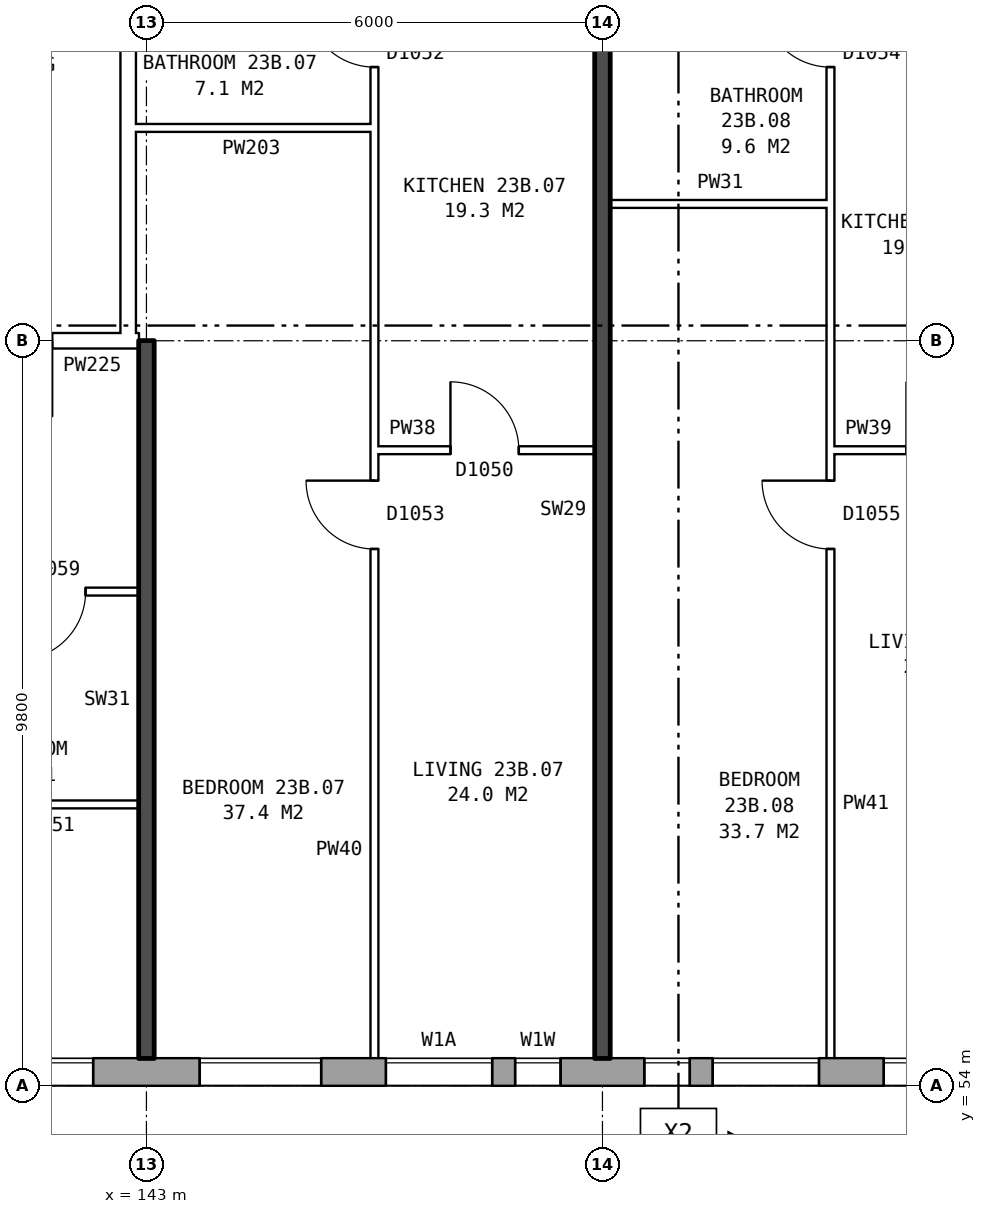
"""IFC4 building model, lengths in metres.
Left out: names, types, materials, properties, quantities, classifications, styles, units other than length and angle.
Written with IfcOpenShell. Run it as: python <this file> out.ifc"""

import sys

from ifc_helpers import new_model, si_unit, direction, frame, frame_2d, origin, place, context, subcontext, project, spatial, rectangle, extrude, element, fill, save


model = new_model("IFC4")
c1 = context("Model", 3, precision=1e-05, world=origin(), true_north=direction((0.0, 1.0)))
c2 = subcontext(c1, "Body", "Model", "MODEL_VIEW")
j1 = project(units=[si_unit("LENGTHUNIT", "METRE"), si_unit("PLANEANGLEUNIT", "RADIAN")], contexts=[c1])
p1 = place(None, origin())
s1 = spatial("IfcSite", under=j1, at=p1, CompositionType="ELEMENT")
p2 = place(p1, origin())
s2 = spatial("IfcBuilding", under=s1, at=p2, CompositionType="ELEMENT")
p3 = place(p2, frame((0.0, 0.0, 84.0)))
s3 = spatial("IfcBuildingStorey", under=s2, at=p3, CompositionType="ELEMENT", Elevation=84.0)
p4 = place(p3, frame((134.075, 54.18, 0.0), z_axis=(0.0, 0.0, 1.0), x_axis=(1.0, 0.0, 0.0)))
e1 = element("IfcWall", 1, at=p4, inside=s3, PredefinedType="STANDARD", context=c2, shape_type="SweptSolid", body=[
    extrude(rectangle(XDim=38.101, YDim=0.36, at=frame_2d((19.05, 0.0))), origin(), (0.0, 0.0, 1.0), 2.85),
])
p5 = place(p4, frame((0.625, 0.0, 0.8)))
e2 = element("IfcOpeningElement", 2, at=p5, cuts=e1, PredefinedType="OPENING", context=c2, shape_type="SweptSolid", body=[
    extrude(rectangle(XDim=1.6, YDim=1.8, at=frame_2d((0.8, 0.9))), frame((0.0, 0.19, 0.0), z_axis=(0.0, -1.0, 0.0), x_axis=(1.0, 0.0, 0.0)), (0.0, 0.0, 1.0), 0.38),
])
p6 = place(p4, frame((3.625, 0.0, 0.8)))
e3 = element("IfcOpeningElement", 3, at=p6, cuts=e1, PredefinedType="OPENING", context=c2, shape_type="SweptSolid", body=[
    extrude(rectangle(XDim=1.6, YDim=1.8, at=frame_2d((0.8, 0.9))), frame((0.0, 0.19, 0.0), z_axis=(0.0, -1.0, 0.0), x_axis=(1.0, 0.0, 0.0)), (0.0, 0.0, 1.0), 0.38),
])
p7 = place(p4, frame((6.625, 0.0, 0.8)))
e4 = element("IfcOpeningElement", 4, at=p7, cuts=e1, PredefinedType="OPENING", context=c2, shape_type="SweptSolid", body=[
    extrude(rectangle(XDim=1.6, YDim=1.8, at=frame_2d((0.8, 0.9))), frame((0.0, 0.19, 0.0), z_axis=(0.0, -1.0, 0.0), x_axis=(1.0, 0.0, 0.0)), (0.0, 0.0, 1.0), 0.38),
])
p8 = place(p4, frame((9.625, 0.0, 0.8)))
e5 = element("IfcOpeningElement", 5, at=p8, cuts=e1, PredefinedType="OPENING", context=c2, shape_type="SweptSolid", body=[
    extrude(rectangle(XDim=1.6, YDim=1.8, at=frame_2d((0.8, 0.9))), frame((0.0, 0.19, 0.0), z_axis=(0.0, -1.0, 0.0), x_axis=(1.0, 0.0, 0.0)), (0.0, 0.0, 1.0), 0.38),
])
p9 = place(p4, frame((12.075, 0.0, 0.8)))
e6 = element("IfcOpeningElement", 6, at=p9, cuts=e1, PredefinedType="OPENING", context=c2, shape_type="SweptSolid", body=[
    extrude(rectangle(XDim=1.4, YDim=1.8, at=frame_2d((0.7, 0.9))), frame((0.0, 0.19, 0.0), z_axis=(0.0, -1.0, 0.0), x_axis=(1.0, 0.0, 0.0)), (0.0, 0.0, 1.0), 0.38),
])
p10 = place(p4, frame((15.475, 0.0, 0.65)))
e7 = element("IfcOpeningElement", 7, at=p10, cuts=e1, PredefinedType="OPENING", context=c2, shape_type="SweptSolid", body=[
    extrude(rectangle(XDim=0.6, YDim=0.9, at=frame_2d((0.3, 0.45))), frame((0.0, 0.19, 0.0), z_axis=(0.0, -1.0, 0.0), x_axis=(1.0, 0.0, 0.0)), (0.0, 0.0, 1.0), 0.38),
])
p11 = place(p4, frame((18.625, 0.0, 0.8)))
e8 = element("IfcOpeningElement", 8, at=p11, cuts=e1, PredefinedType="OPENING", context=c2, shape_type="SweptSolid", body=[
    extrude(rectangle(XDim=1.6, YDim=1.8, at=frame_2d((0.8, 0.9))), frame((0.0, 0.19, 0.0), z_axis=(0.0, -1.0, 0.0), x_axis=(1.0, 0.0, 0.0)), (0.0, 0.0, 1.0), 0.38),
])
p12 = place(p4, frame((21.125, 0.0, 0.8)))
e9 = element("IfcOpeningElement", 9, at=p12, cuts=e1, PredefinedType="OPENING", context=c2, shape_type="SweptSolid", body=[
    extrude(rectangle(XDim=1.0, YDim=1.2, at=frame_2d((0.5, 0.6))), frame((0.0, 0.19, 0.0), z_axis=(0.0, -1.0, 0.0), x_axis=(1.0, 0.0, 0.0)), (0.0, 0.0, 1.0), 0.38),
])
p13 = place(p4, frame((24.625, 0.0, 0.8)))
e10 = element("IfcOpeningElement", 10, at=p13, cuts=e1, PredefinedType="OPENING", context=c2, shape_type="SweptSolid", body=[
    extrude(rectangle(XDim=1.6, YDim=1.8, at=frame_2d((0.8, 0.9))), frame((0.0, 0.19, 0.0), z_axis=(0.0, -1.0, 0.0), x_axis=(1.0, 0.0, 0.0)), (0.0, 0.0, 1.0), 0.38),
])
p14 = place(p4, frame((27.625, 0.0, 0.8)))
e11 = element("IfcOpeningElement", 11, at=p14, cuts=e1, PredefinedType="OPENING", context=c2, shape_type="SweptSolid", body=[
    extrude(rectangle(XDim=1.6, YDim=1.8, at=frame_2d((0.8, 0.9))), frame((0.0, 0.19, 0.0), z_axis=(0.0, -1.0, 0.0), x_axis=(1.0, 0.0, 0.0)), (0.0, 0.0, 1.0), 0.38),
])
p15 = place(p4, frame((30.625, 0.0, 0.8)))
e12 = element("IfcOpeningElement", 12, at=p15, cuts=e1, PredefinedType="OPENING", context=c2, shape_type="SweptSolid", body=[
    extrude(rectangle(XDim=1.6, YDim=1.8, at=frame_2d((0.8, 0.9))), frame((0.0, 0.19, 0.0), z_axis=(0.0, -1.0, 0.0), x_axis=(1.0, 0.0, 0.0)), (0.0, 0.0, 1.0), 0.38),
])
p16 = place(p4, frame((33.625, 0.0, 0.8)))
e13 = element("IfcOpeningElement", 13, at=p16, cuts=e1, PredefinedType="OPENING", context=c2, shape_type="SweptSolid", body=[
    extrude(rectangle(XDim=1.6, YDim=1.8, at=frame_2d((0.8, 0.9))), frame((0.0, 0.19, 0.0), z_axis=(0.0, -1.0, 0.0), x_axis=(1.0, 0.0, 0.0)), (0.0, 0.0, 1.0), 0.38),
])
p17 = place(p4, frame((13.775, 0.0, 1.6)))
e14 = element("IfcOpeningElement", 14, at=p17, cuts=e1, PredefinedType="OPENING", context=c2, shape_type="SweptSolid", body=[
    extrude(rectangle(XDim=0.6, YDim=0.9, at=frame_2d((0.3, 0.45))), frame((0.0, 0.19, 0.0), z_axis=(0.0, -1.0, 0.0), x_axis=(1.0, 0.0, 0.0)), (0.0, 0.0, 1.0), 0.38),
])
p18 = place(p4, frame((16.375, 0.0, 0.65)))
e15 = element("IfcOpeningElement", 15, at=p18, cuts=e1, PredefinedType="OPENING", context=c2, shape_type="SweptSolid", body=[
    extrude(rectangle(XDim=1.4, YDim=1.8, at=frame_2d((0.7, 0.9))), frame((0.0, 0.19, 0.0), z_axis=(0.0, -1.0, 0.0), x_axis=(1.0, 0.0, 0.0)), (0.0, 0.0, 1.0), 0.38),
])
p19 = place(p4, frame((23.625, 0.0, 1.7)))
e16 = element("IfcOpeningElement", 16, at=p19, cuts=e1, PredefinedType="OPENING", context=c2, shape_type="SweptSolid", body=[
    extrude(rectangle(XDim=0.6, YDim=0.9, at=frame_2d((0.3, 0.45))), frame((0.0, 0.19, 0.0), z_axis=(0.0, -1.0, 0.0), x_axis=(1.0, 0.0, 0.0)), (0.0, 0.0, 1.0), 0.38),
])
p20 = place(p3, frame((142.76, 63.9, 0.0), z_axis=(0.0, 0.0, 1.0), x_axis=(0.0, 1.0, 0.0)))
e17 = element("IfcWall", 17, at=p20, inside=s3, PredefinedType="PARTITIONING", context=c2, shape_type="SweptSolid", body=[
    extrude(rectangle(XDim=12.2, YDim=0.2, at=frame_2d((6.1, 0.0))), origin(), (0.0, 0.0, 1.0), 2.85),
])
p21 = place(p20, frame((5.1, 0.0, 0.0)))
e18 = element("IfcOpeningElement", 18, at=p21, cuts=e17, PredefinedType="OPENING", context=c2, shape_type="SweptSolid", body=[
    extrude(rectangle(XDim=2.0, YDim=2.1, at=frame_2d((1.0, 1.05))), frame((0.0, 0.11, 0.0), z_axis=(0.0, -1.0, 0.0), x_axis=(1.0, 0.0, 0.0)), (0.0, 0.0, 1.0), 0.22),
])
p22 = place(p3, frame((140.6, 57.7, 0.0), z_axis=(0.0, 0.0, 1.0), x_axis=(1.0, 0.0, 0.0)))
e19 = element("IfcWall", 19, at=p22, inside=s3, PredefinedType="PARTITIONING", context=c2, shape_type="SweptSolid", body=[
    extrude(rectangle(XDim=2.3, YDim=0.1, at=frame_2d((1.15, 0.0))), origin(), (0.0, 0.0, 1.0), 2.85),
])
p23 = place(p3, frame((137.1, 60.5, 0.0), z_axis=(0.0, 0.0, 1.0), x_axis=(1.0, 0.0, 0.0)))
e20 = element("IfcWall", 20, at=p23, inside=s3, PredefinedType="PARTITIONING", context=c2, shape_type="SweptSolid", body=[
    extrude(rectangle(XDim=5.8, YDim=0.1, at=frame_2d((2.9, 0.0))), origin(), (0.0, 0.0, 1.0), 2.85),
])
p24 = place(p23, frame((1.3, 0.0, 0.0)))
e21 = element("IfcOpeningElement", 21, at=p24, cuts=e20, PredefinedType="OPENING", context=c2, shape_type="SweptSolid", body=[
    extrude(rectangle(XDim=0.9, YDim=2.1, at=frame_2d((0.45, 1.05))), frame((0.0, 0.06, 0.0), z_axis=(0.0, -1.0, 0.0), x_axis=(1.0, 0.0, 0.0)), (0.0, 0.0, 1.0), 0.12),
])
p25 = place(p23, frame((4.2, 0.0, 0.0)))
e22 = element("IfcOpeningElement", 22, at=p25, cuts=e20, PredefinedType="OPENING", context=c2, shape_type="SweptSolid", body=[
    extrude(rectangle(XDim=0.9, YDim=2.1, at=frame_2d((0.45, 1.05))), frame((0.0, 0.06, 0.0), z_axis=(0.0, -1.0, 0.0), x_axis=(1.0, 0.0, 0.0)), (0.0, 0.0, 1.0), 0.12),
])
p26 = place(p3, frame((146.0, 62.36, 0.0), z_axis=(0.0, 0.0, 1.0), x_axis=(1.0, 0.0, 0.0)))
e23 = element("IfcWall", 23, at=p26, inside=s3, PredefinedType="PARTITIONING", context=c2, shape_type="SweptSolid", body=[
    extrude(rectangle(XDim=2.9, YDim=0.1, at=frame_2d((1.45, 0.0))), origin(), (0.0, 0.0, 1.0), 2.85),
])
p27 = place(p26, frame((1.0, 0.0, 0.0)))
e24 = element("IfcOpeningElement", 24, at=p27, cuts=e23, PredefinedType="OPENING", context=c2, shape_type="SweptSolid", body=[
    extrude(rectangle(XDim=0.9, YDim=2.1, at=frame_2d((0.45, 1.05))), frame((0.0, 0.06, 0.0), z_axis=(0.0, -1.0, 0.0), x_axis=(1.0, 0.0, 0.0)), (0.0, 0.0, 1.0), 0.12),
])
p28 = place(p3, frame((152.0, 62.36, 0.0), z_axis=(0.0, 0.0, 1.0), x_axis=(1.0, 0.0, 0.0)))
e25 = element("IfcWall", 25, at=p28, inside=s3, PredefinedType="PARTITIONING", context=c2, shape_type="SweptSolid", body=[
    extrude(rectangle(XDim=2.9, YDim=0.1, at=frame_2d((1.45, 0.0))), origin(), (0.0, 0.0, 1.0), 2.85),
])
p29 = place(p28, frame((1.0, 0.0, 0.0)))
e26 = element("IfcOpeningElement", 26, at=p29, cuts=e25, PredefinedType="OPENING", context=c2, shape_type="SweptSolid", body=[
    extrude(rectangle(XDim=0.9, YDim=2.1, at=frame_2d((0.45, 1.05))), frame((0.0, 0.06, 0.0), z_axis=(0.0, -1.0, 0.0), x_axis=(1.0, 0.0, 0.0)), (0.0, 0.0, 1.0), 0.12),
])
p30 = place(p3, frame((139.76, 63.8, 0.0), z_axis=(0.0, 0.0, 1.0), x_axis=(1.0, 0.0, 0.0)))
e27 = element("IfcWall", 27, at=p30, inside=s3, PredefinedType="PARTITIONING", context=c2, shape_type="SweptSolid", body=[
    extrude(rectangle(XDim=3.0, YDim=0.2, at=frame_2d((1.5, 0.0))), origin(), (0.0, 0.0, 1.0), 2.85),
])
p31 = place(p30, frame((1.0, 0.0, 0.0)))
e28 = element("IfcOpeningElement", 28, at=p31, cuts=e27, PredefinedType="OPENING", context=c2, shape_type="SweptSolid", body=[
    extrude(rectangle(XDim=1.0, YDim=2.1, at=frame_2d((0.5, 1.05))), frame((0.0, 0.11, 0.0), z_axis=(0.0, -1.0, 0.0), x_axis=(1.0, 0.0, 0.0)), (0.0, 0.0, 1.0), 0.22),
])
p32 = place(p3, frame((142.76, 63.8, 0.0), z_axis=(0.0, 0.0, 1.0), x_axis=(1.0, 0.0, 0.0)))
e29 = element("IfcWall", 29, at=p32, inside=s3, PredefinedType="PARTITIONING", context=c2, shape_type="SweptSolid", body=[
    extrude(rectangle(XDim=0.14, YDim=0.2, at=frame_2d((0.07, 0.0))), origin(), (0.0, 0.0, 1.0), 2.85),
])
p33 = place(p3, frame((149.1, 65.6, 0.0), z_axis=(0.0, 0.0, 1.0), x_axis=(1.0, 0.0, 0.0)))
e30 = element("IfcWall", 30, at=p33, inside=s3, PredefinedType="PARTITIONING", context=c2, shape_type="SweptSolid", body=[
    extrude(rectangle(XDim=2.9, YDim=0.1, at=frame_2d((1.45, 0.0))), origin(), (0.0, 0.0, 1.0), 2.85),
])
p34 = place(p3, frame((142.76, 66.6, 0.0), z_axis=(0.0, 0.0, 1.0), x_axis=(1.0, 0.0, 0.0)))
e31 = element("IfcWall", 31, at=p34, inside=s3, PredefinedType="PARTITIONING", context=c2, shape_type="SweptSolid", body=[
    extrude(rectangle(XDim=3.24, YDim=0.1, at=frame_2d((1.62, 0.0))), origin(), (0.0, 0.0, 1.0), 2.85),
])
p35 = place(p3, frame((143.0, 54.36, 0.0), z_axis=(0.0, 0.0, 1.0), x_axis=(0.0, 1.0, 0.0)))
e32 = element("IfcWall", 32, at=p35, inside=s3, PredefinedType="SOLIDWALL", context=c2, shape_type="SweptSolid", body=[
    extrude(rectangle(XDim=9.44, YDim=0.2, at=frame_2d((4.72, 0.0))), origin(), (0.0, 0.0, 1.0), 2.85),
])
p36 = place(p3, frame((146.0, 54.36, 0.0), z_axis=(0.0, 0.0, 1.0), x_axis=(0.0, 1.0, 0.0)))
e33 = element("IfcWall", 33, at=p36, inside=s3, PredefinedType="PARTITIONING", context=c2, shape_type="SweptSolid", body=[
    extrude(rectangle(XDim=14.34, YDim=0.1, at=frame_2d((7.17, 0.0))), origin(), (0.0, 0.0, 1.0), 2.85),
])
p37 = place(p36, frame((6.7, 0.0, 0.0)))
e34 = element("IfcOpeningElement", 34, at=p37, cuts=e33, PredefinedType="OPENING", context=c2, shape_type="SweptSolid", body=[
    extrude(rectangle(XDim=0.9, YDim=2.1, at=frame_2d((0.45, 1.05))), frame((0.0, 0.06, 0.0), z_axis=(0.0, -1.0, 0.0), x_axis=(1.0, 0.0, 0.0)), (0.0, 0.0, 1.0), 0.12),
])
p38 = place(p36, frame((13.04, 0.0, 0.0)))
e35 = element("IfcOpeningElement", 35, at=p38, cuts=e33, PredefinedType="OPENING", context=c2, shape_type="SweptSolid", body=[
    extrude(rectangle(XDim=0.9, YDim=2.1, at=frame_2d((0.45, 1.05))), frame((0.0, 0.06, 0.0), z_axis=(0.0, -1.0, 0.0), x_axis=(1.0, 0.0, 0.0)), (0.0, 0.0, 1.0), 0.12),
])
p39 = place(p3, frame((149.0, 54.36, 0.0), z_axis=(0.0, 0.0, 1.0), x_axis=(0.0, 1.0, 0.0)))
e36 = element("IfcWall", 36, at=p39, inside=s3, PredefinedType="SOLIDWALL", context=c2, shape_type="SweptSolid", body=[
    extrude(rectangle(XDim=14.44, YDim=0.2, at=frame_2d((7.22, 0.0))), origin(), (0.0, 0.0, 1.0), 2.85),
])
p40 = place(p3, frame((152.0, 54.36, 0.0), z_axis=(0.0, 0.0, 1.0), x_axis=(0.0, 1.0, 0.0)))
e37 = element("IfcWall", 37, at=p40, inside=s3, PredefinedType="PARTITIONING", context=c2, shape_type="SweptSolid", body=[
    extrude(rectangle(XDim=14.34, YDim=0.1, at=frame_2d((7.17, 0.0))), origin(), (0.0, 0.0, 1.0), 2.85),
])
p41 = place(p40, frame((6.7, 0.0, 0.0)))
e38 = element("IfcOpeningElement", 38, at=p41, cuts=e37, PredefinedType="OPENING", context=c2, shape_type="SweptSolid", body=[
    extrude(rectangle(XDim=0.9, YDim=2.1, at=frame_2d((0.45, 1.05))), frame((0.0, 0.06, 0.0), z_axis=(0.0, -1.0, 0.0), x_axis=(1.0, 0.0, 0.0)), (0.0, 0.0, 1.0), 0.12),
])
p42 = place(p40, frame((13.04, 0.0, 0.0)))
e39 = element("IfcOpeningElement", 39, at=p42, cuts=e37, PredefinedType="OPENING", context=c2, shape_type="SweptSolid", body=[
    extrude(rectangle(XDim=0.9, YDim=2.1, at=frame_2d((0.45, 1.05))), frame((0.0, 0.06, 0.0), z_axis=(0.0, -1.0, 0.0), x_axis=(1.0, 0.0, 0.0)), (0.0, 0.0, 1.0), 0.12),
])
p43 = place(p7, origin())
e40 = element("IfcWindow", 40, at=p43, inside=s3, PartitioningType="SINGLE_PANEL", PredefinedType="WINDOW", context=c2, shape_type="SweptSolid", body=[
    extrude(rectangle(XDim=1.6, YDim=1.8, at=frame_2d((0.8, 0.9))), frame((0.0, 0.15, 0.0), z_axis=(0.0, -1.0, 0.0), x_axis=(1.0, 0.0, 0.0)), (0.0, 0.0, 1.0), 0.06),
])
fill(e4, e40)
p44 = place(p8, origin())
e41 = element("IfcWindow", 41, at=p44, inside=s3, PartitioningType="SINGLE_PANEL", PredefinedType="WINDOW", context=c2, shape_type="SweptSolid", body=[
    extrude(rectangle(XDim=1.6, YDim=1.8, at=frame_2d((0.8, 0.9))), frame((0.0, 0.15, 0.0), z_axis=(0.0, -1.0, 0.0), x_axis=(1.0, 0.0, 0.0)), (0.0, 0.0, 1.0), 0.06),
])
fill(e5, e41)
p45 = place(p9, origin())
e42 = element("IfcWindow", 42, at=p45, inside=s3, PartitioningType="SINGLE_PANEL", PredefinedType="WINDOW", context=c2, shape_type="SweptSolid", body=[
    extrude(rectangle(XDim=1.4, YDim=1.8, at=frame_2d((0.7, 0.9))), frame((0.0, 0.15, 0.0), z_axis=(0.0, -1.0, 0.0), x_axis=(1.0, 0.0, 0.0)), (0.0, 0.0, 1.0), 0.06),
])
fill(e6, e42)
p46 = place(p10, origin())
e43 = element("IfcWindow", 43, at=p46, inside=s3, PartitioningType="SINGLE_PANEL", PredefinedType="WINDOW", context=c2, shape_type="SweptSolid", body=[
    extrude(rectangle(XDim=0.6, YDim=0.9, at=frame_2d((0.3, 0.45))), frame((0.0, 0.15, 0.0), z_axis=(0.0, -1.0, 0.0), x_axis=(1.0, 0.0, 0.0)), (0.0, 0.0, 1.0), 0.06),
])
fill(e7, e43)
p47 = place(p11, origin())
e44 = element("IfcWindow", 44, at=p47, inside=s3, PartitioningType="SINGLE_PANEL", PredefinedType="WINDOW", context=c2, shape_type="SweptSolid", body=[
    extrude(rectangle(XDim=1.6, YDim=1.8, at=frame_2d((0.8, 0.9))), frame((0.0, 0.15, 0.0), z_axis=(0.0, -1.0, 0.0), x_axis=(1.0, 0.0, 0.0)), (0.0, 0.0, 1.0), 0.06),
])
fill(e8, e44)
p48 = place(p25, frame((0.9, 0.0, 0.0), z_axis=(0.0, 0.0, 1.0), x_axis=(-1.0, 0.0, 0.0)))
e45 = element("IfcDoor", 45, at=p48, inside=s3, OperationType="SINGLE_SWING_RIGHT", PredefinedType="DOOR", context=c2, shape_type="SweptSolid", body=[
    extrude(rectangle(XDim=0.9, YDim=2.1, at=frame_2d((0.45, 1.05))), frame((0.0, 0.025, 0.0), z_axis=(0.0, -1.0, 0.0), x_axis=(1.0, 0.0, 0.0)), (0.0, 0.0, 1.0), 0.05),
])
fill(e22, e45)
p49 = place(p37, origin())
e46 = element("IfcDoor", 46, at=p49, inside=s3, OperationType="SINGLE_SWING_RIGHT", PredefinedType="DOOR", context=c2, shape_type="SweptSolid", body=[
    extrude(rectangle(XDim=0.9, YDim=2.1, at=frame_2d((0.45, 1.05))), frame((0.0, 0.025, 0.0), z_axis=(0.0, -1.0, 0.0), x_axis=(1.0, 0.0, 0.0)), (0.0, 0.0, 1.0), 0.05),
])
fill(e34, e46)
p50 = place(p27, origin())
e47 = element("IfcDoor", 47, at=p50, inside=s3, OperationType="SINGLE_SWING_LEFT", PredefinedType="DOOR", context=c2, shape_type="SweptSolid", body=[
    extrude(rectangle(XDim=0.9, YDim=2.1, at=frame_2d((0.45, 1.05))), frame((0.0, 0.025, 0.0), z_axis=(0.0, -1.0, 0.0), x_axis=(1.0, 0.0, 0.0)), (0.0, 0.0, 1.0), 0.05),
])
fill(e24, e47)
p51 = place(p38, origin())
e48 = element("IfcDoor", 48, at=p51, inside=s3, OperationType="SINGLE_SWING_RIGHT", PredefinedType="DOOR", context=c2, shape_type="SweptSolid", body=[
    extrude(rectangle(XDim=0.9, YDim=2.1, at=frame_2d((0.45, 1.05))), frame((0.0, 0.025, 0.0), z_axis=(0.0, -1.0, 0.0), x_axis=(1.0, 0.0, 0.0)), (0.0, 0.0, 1.0), 0.05),
])
fill(e35, e48)
p52 = place(p41, origin())
e49 = element("IfcDoor", 49, at=p52, inside=s3, OperationType="SINGLE_SWING_RIGHT", PredefinedType="DOOR", context=c2, shape_type="SweptSolid", body=[
    extrude(rectangle(XDim=0.9, YDim=2.1, at=frame_2d((0.45, 1.05))), frame((0.0, 0.025, 0.0), z_axis=(0.0, -1.0, 0.0), x_axis=(1.0, 0.0, 0.0)), (0.0, 0.0, 1.0), 0.05),
])
fill(e38, e49)
p53 = place(p42, origin())
e50 = element("IfcDoor", 50, at=p53, inside=s3, OperationType="SINGLE_SWING_RIGHT", PredefinedType="DOOR", context=c2, shape_type="SweptSolid", body=[
    extrude(rectangle(XDim=0.9, YDim=2.1, at=frame_2d((0.45, 1.05))), frame((0.0, 0.025, 0.0), z_axis=(0.0, -1.0, 0.0), x_axis=(1.0, 0.0, 0.0)), (0.0, 0.0, 1.0), 0.05),
])
fill(e39, e50)
p54 = place(p17, origin())
e51 = element("IfcWindow", 51, at=p54, inside=s3, PartitioningType="SINGLE_PANEL", PredefinedType="WINDOW", context=c2, shape_type="SweptSolid", body=[
    extrude(rectangle(XDim=0.6, YDim=0.9, at=frame_2d((0.3, 0.45))), frame((0.0, 0.15, 0.0), z_axis=(0.0, -1.0, 0.0), x_axis=(1.0, 0.0, 0.0)), (0.0, 0.0, 1.0), 0.06),
])
fill(e14, e51)
p55 = place(p18, origin())
e52 = element("IfcWindow", 52, at=p55, inside=s3, PartitioningType="SINGLE_PANEL", PredefinedType="WINDOW", context=c2, shape_type="SweptSolid", body=[
    extrude(rectangle(XDim=1.4, YDim=1.8, at=frame_2d((0.7, 0.9))), frame((0.0, 0.15, 0.0), z_axis=(0.0, -1.0, 0.0), x_axis=(1.0, 0.0, 0.0)), (0.0, 0.0, 1.0), 0.06),
])
fill(e15, e52)
save(model, sys.argv[1])
